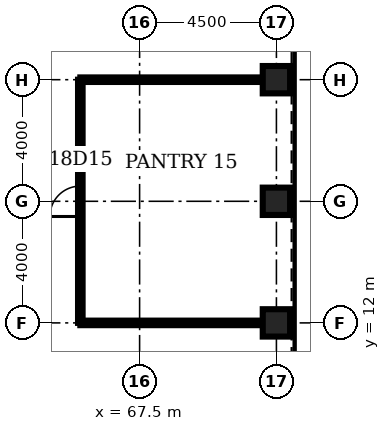
"""IFC4 building model, lengths in metres.
Left out: names, types, materials, properties, quantities, classifications, styles, units other than length and angle.
Written with IfcOpenShell. Run it as: python <this file> out.ifc"""

import sys

from ifc_helpers import new_model, si_unit, direction, frame, frame_2d, origin, origin_2d, place, context, subcontext, project, spatial, rectangle, hollow_rectangle, extrude, element, fill, save


model = new_model("IFC4")
c1 = context("Model", 3, precision=1e-05, world=origin(), true_north=direction((0.0, 1.0)))
c2 = subcontext(c1, "Body", "Model", "MODEL_VIEW")
j1 = project(units=[si_unit("LENGTHUNIT", "METRE"), si_unit("PLANEANGLEUNIT", "RADIAN")], contexts=[c1])
p1 = place(None, origin())
s1 = spatial("IfcSite", under=j1, at=p1, CompositionType="ELEMENT")
p2 = place(p1, origin())
s2 = spatial("IfcBuilding", under=s1, at=p2, CompositionType="ELEMENT")
p3 = place(p2, frame((0.0, 0.0, 86.0)))
s3 = spatial("IfcBuildingStorey", under=s2, at=p3, CompositionType="ELEMENT", Elevation=86.0)
for number, where, z_axis, x_axis in (
    (1, (72.0, 12.0, 0.0), (0.0, 0.0, 1.0), (1.0, 0.0, 0.0)),
    (2, (72.0, 16.0, 0.0), (0.0, 0.0, 1.0), (1.0, 0.0, 0.0)),
    (3, (72.0, 20.0, 0.0), (0.0, 0.0, 1.0), (1.0, 0.0, 0.0)),
):
    element("IfcColumn", number, at=place(p3, frame(where, z_axis=z_axis, x_axis=x_axis)), inside=s3, PredefinedType="COLUMN", context=c2, shape_type="SweptSolid", body=[
        extrude(hollow_rectangle(XDim=0.9, YDim=0.9, WallThickness=0.11, at=origin_2d()), origin(), (0.0, 0.0, 1.0), 4.5),
    ])
for number, where, z_axis, x_axis in (
    (4, (65.55, 12.0, 0.0), (0.0, 0.0, 1.0), (1.0, 0.0, 0.0)),
    (5, (65.55, 20.0, 0.0), (0.0, 0.0, 1.0), (1.0, 0.0, 0.0)),
):
    element("IfcWall", number, at=place(p3, frame(where, z_axis=z_axis, x_axis=x_axis)), inside=s3, PredefinedType="PARTITIONING", context=c2, shape_type="SweptSolid", body=[
        extrude(rectangle(XDim=6.0, YDim=0.15, at=frame_2d((3.0, 0.0))), origin(), (0.0, 0.0, 1.0), 3.0),
    ])
p4 = place(p3, frame((65.55, 12.0, 0.0), z_axis=(0.0, 0.0, 1.0), x_axis=(0.0, 1.0, 0.0)))
e6 = element("IfcWall", 6, at=p4, inside=s3, PredefinedType="PARTITIONING", context=c2, shape_type="SweptSolid", body=[
    extrude(rectangle(XDim=8.0, YDim=0.15, at=frame_2d((4.0, 0.0))), origin(), (0.0, 0.0, 1.0), 3.0),
])
p5 = place(p4, frame((3.5, 0.0, 0.0)))
e7 = element("IfcOpeningElement", 7, at=p5, cuts=e6, PredefinedType="OPENING", context=c2, shape_type="SweptSolid", body=[
    extrude(rectangle(XDim=1.0, YDim=2.1, at=frame_2d((0.5, 1.05))), frame((0.0, 0.085, 0.0), z_axis=(0.0, -1.0, 0.0), x_axis=(1.0, 0.0, 0.0)), (0.0, 0.0, 1.0), 0.17),
])
p6 = place(p5, origin())
e8 = element("IfcDoor", 8, at=p6, inside=s3, OperationType="SINGLE_SWING_LEFT", PredefinedType="DOOR", context=c2, shape_type="SweptSolid", body=[
    extrude(rectangle(XDim=1.0, YDim=2.1, at=frame_2d((0.5, 1.05))), frame((0.0, 0.025, 0.0), z_axis=(0.0, -1.0, 0.0), x_axis=(1.0, 0.0, 0.0)), (0.0, 0.0, 1.0), 0.05),
])
fill(e7, e8)
save(model, sys.argv[1])
